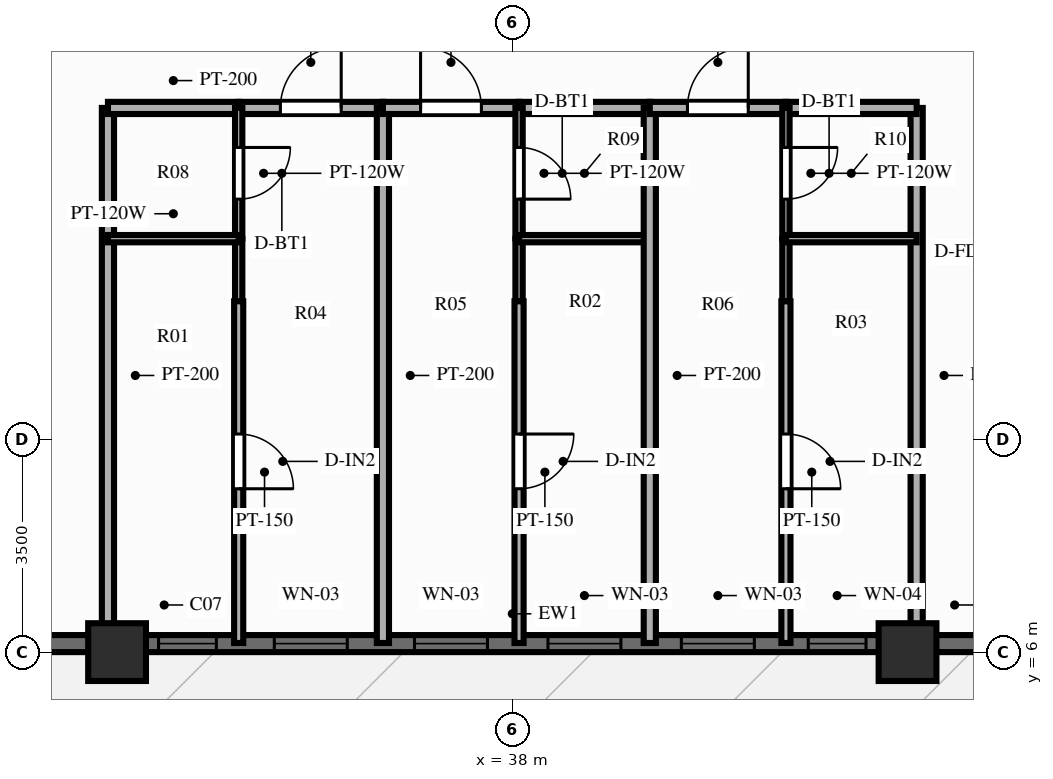
"""IFC4 building model, lengths in metres.
Left out: names, types, materials, properties, quantities, classifications, styles, units other than length and angle.
Written with IfcOpenShell. Run it as: python <this file> out.ifc"""

import sys

from ifc_helpers import new_model, si_unit, direction, frame, frame_2d, origin, origin_2d, place, context, subcontext, project, spatial, rectangle, extrude, source, transform, mapped, element, fill, save


model = new_model("IFC4")
c1 = context("Model", 3, precision=1e-05, world=origin(), true_north=direction((0.0, 1.0)))
c2 = subcontext(c1, "Body", "Model", "MODEL_VIEW")
j1 = project(units=[si_unit("LENGTHUNIT", "METRE"), si_unit("PLANEANGLEUNIT", "RADIAN")], contexts=[c1])
p1 = place(None, origin())
s1 = spatial("IfcSite", under=j1, at=p1, CompositionType="ELEMENT")
p2 = place(p1, origin())
s2 = spatial("IfcBuilding", under=s1, at=p2, CompositionType="ELEMENT")
p3 = place(p2, frame((0.0, 0.0, 163.0)))
s3 = spatial("IfcBuildingStorey", under=s2, at=p3, CompositionType="ELEMENT", Elevation=163.0)
m1 = source(origin(), c2, "Body", "SweptSolid", [
    extrude(rectangle(XDim=0.95, YDim=0.95, at=origin_2d()), origin(), (0.0, 0.0, 1.0), 3.0),
])
for number, where, z_axis, x_axis in (
    (1, (31.5, 6.0, 0.0), (0.0, 0.0, 1.0), (1.0, 0.0, 0.0)),
    (2, (44.5, 6.0, 0.0), (0.0, 0.0, 1.0), (1.0, 0.0, 0.0)),
):
    element("IfcColumn", number, at=place(p3, frame(where, z_axis=z_axis, x_axis=x_axis)), inside=s3, PredefinedType="COLUMN", context=c2, shape_type="MappedRepresentation", body=[
        mapped(m1, transform((0.0, 0.0, 0.0), scale=1.0)),
    ])
p4 = place(p3, frame((21.0, 6.14, 0.0), z_axis=(0.0, 0.0, 1.0), x_axis=(1.0, 0.0, 0.0)))
e3 = element("IfcWall", 3, at=p4, inside=s3, PredefinedType="SOLIDWALL", context=c2, shape_type="SweptSolid", body=[
    extrude(rectangle(XDim=34.0, YDim=0.28, at=frame_2d((17.0, 0.0))), origin(), (0.0, 0.0, 1.0), 2.28),
])
p5 = place(p4, frame((5.8, 0.0, 0.0), z_axis=(0.0, 0.0, 1.0), x_axis=(-1.0, 0.0, 0.0)))
e4 = element("IfcOpeningElement", 4, at=p5, cuts=e3, PredefinedType="OPENING", context=c2, shape_type="SweptSolid", body=[
    extrude(rectangle(XDim=1.1, YDim=2.15, at=frame_2d((0.55, 1.075))), frame((0.0, 0.152, 0.0), z_axis=(0.0, -1.0, 0.0), x_axis=(1.0, 0.0, 0.0)), (0.0, 0.0, 1.0), 0.304),
])
p6 = place(p4, frame((11.183, 0.0, 0.25)))
e5 = element("IfcOpeningElement", 5, at=p6, cuts=e3, PredefinedType="OPENING", context=c2, shape_type="SweptSolid", body=[
    extrude(rectangle(XDim=0.95, YDim=1.5, at=frame_2d((0.475, 0.75))), frame((0.0, 0.152, 0.0), z_axis=(0.0, -1.0, 0.0), x_axis=(1.0, 0.0, 0.0)), (0.0, 0.0, 1.0), 0.304),
])
p7 = place(p4, frame((13.086, 0.0, 0.25)))
e6 = element("IfcOpeningElement", 6, at=p7, cuts=e3, PredefinedType="OPENING", context=c2, shape_type="SweptSolid", body=[
    extrude(rectangle(XDim=1.2, YDim=1.5, at=frame_2d((0.6, 0.75))), frame((0.0, 0.152, 0.0), z_axis=(0.0, -1.0, 0.0), x_axis=(1.0, 0.0, 0.0)), (0.0, 0.0, 1.0), 0.304),
])
p8 = place(p4, frame((15.392, 0.0, 0.25)))
e7 = element("IfcOpeningElement", 7, at=p8, cuts=e3, PredefinedType="OPENING", context=c2, shape_type="SweptSolid", body=[
    extrude(rectangle(XDim=1.2, YDim=1.5, at=frame_2d((0.6, 0.75))), frame((0.0, 0.152, 0.0), z_axis=(0.0, -1.0, 0.0), x_axis=(1.0, 0.0, 0.0)), (0.0, 0.0, 1.0), 0.304),
])
p9 = place(p4, frame((17.586, 0.0, 0.25)))
e8 = element("IfcOpeningElement", 8, at=p9, cuts=e3, PredefinedType="OPENING", context=c2, shape_type="SweptSolid", body=[
    extrude(rectangle(XDim=1.2, YDim=1.5, at=frame_2d((0.6, 0.75))), frame((0.0, 0.152, 0.0), z_axis=(0.0, -1.0, 0.0), x_axis=(1.0, 0.0, 0.0)), (0.0, 0.0, 1.0), 0.304),
])
p10 = place(p4, frame((19.781, 0.0, 0.25)))
e9 = element("IfcOpeningElement", 9, at=p10, cuts=e3, PredefinedType="OPENING", context=c2, shape_type="SweptSolid", body=[
    extrude(rectangle(XDim=1.2, YDim=1.5, at=frame_2d((0.6, 0.75))), frame((0.0, 0.152, 0.0), z_axis=(0.0, -1.0, 0.0), x_axis=(1.0, 0.0, 0.0)), (0.0, 0.0, 1.0), 0.304),
])
p11 = place(p4, frame((21.867, 0.0, 0.25)))
e10 = element("IfcOpeningElement", 10, at=p11, cuts=e3, PredefinedType="OPENING", context=c2, shape_type="SweptSolid", body=[
    extrude(rectangle(XDim=0.95, YDim=1.5, at=frame_2d((0.475, 0.75))), frame((0.0, 0.152, 0.0), z_axis=(0.0, -1.0, 0.0), x_axis=(1.0, 0.0, 0.0)), (0.0, 0.0, 1.0), 0.304),
])
p12 = place(p4, frame((28.15, 0.0, 0.25)))
e11 = element("IfcOpeningElement", 11, at=p12, cuts=e3, PredefinedType="OPENING", context=c2, shape_type="SweptSolid", body=[
    extrude(rectangle(XDim=1.2, YDim=1.5, at=frame_2d((0.6, 0.75))), frame((0.0, 0.152, 0.0), z_axis=(0.0, -1.0, 0.0), x_axis=(1.0, 0.0, 0.0)), (0.0, 0.0, 1.0), 0.304),
])
for number, where, z_axis, x_axis in (
    (12, (31.35, 14.95, 0.0), (0.0, 0.0, 1.0), (0.0, -1.0, 0.0)),
    (13, (44.65, 14.95, 0.0), (0.0, 0.0, 1.0), (0.0, -1.0, 0.0)),
):
    element("IfcWall", number, at=place(p3, frame(where, z_axis=z_axis, x_axis=x_axis)), inside=s3, PredefinedType="PARTITIONING", context=c2, shape_type="SweptSolid", body=[
        extrude(rectangle(XDim=8.8, YDim=0.2, at=frame_2d((4.4, 0.0))), origin(), (0.0, 0.0, 1.0), 2.34),
    ])
p13 = place(p3, frame((31.35, 14.95, 0.0), z_axis=(0.0, 0.0, 1.0), x_axis=(1.0, 0.0, 0.0)))
e14 = element("IfcWall", 14, at=p13, inside=s3, PredefinedType="PARTITIONING", context=c2, shape_type="SweptSolid", body=[
    extrude(rectangle(XDim=2.15, YDim=0.2, at=frame_2d((1.075, 0.0))), origin(), (0.0, 0.0, 1.0), 2.79),
])
p14 = place(p3, frame((33.5, 14.95, 0.0), z_axis=(0.0, 0.0, 1.0), x_axis=(1.0, 0.0, 0.0)))
e15 = element("IfcWall", 15, at=p14, inside=s3, PredefinedType="PARTITIONING", context=c2, shape_type="SweptSolid", body=[
    extrude(rectangle(XDim=2.372, YDim=0.2, at=frame_2d((1.186, 0.0))), origin(), (0.0, 0.0, 1.0), 2.79),
])
p15 = place(p14, frame((0.686, 0.0, 0.0)))
e16 = element("IfcOpeningElement", 16, at=p15, cuts=e15, PredefinedType="OPENING", context=c2, shape_type="SweptSolid", body=[
    extrude(rectangle(XDim=1.0, YDim=2.15, at=frame_2d((0.5, 1.075))), frame((0.0, 0.112, 0.0), z_axis=(0.0, -1.0, 0.0), x_axis=(1.0, 0.0, 0.0)), (0.0, 0.0, 1.0), 0.224),
])
p16 = place(p3, frame((33.5, 14.95, 0.0), z_axis=(0.0, 0.0, 1.0), x_axis=(0.0, -1.0, 0.0)))
e17 = element("IfcWall", 17, at=p16, inside=s3, PredefinedType="PARTITIONING", context=c2, shape_type="SweptSolid", body=[
    extrude(rectangle(XDim=2.15, YDim=0.12, at=frame_2d((1.075, 0.0))), origin(), (0.0, 0.0, 1.0), 2.79),
])
p17 = place(p16, frame((0.65, 0.0, 0.0)))
e18 = element("IfcOpeningElement", 18, at=p17, cuts=e17, PredefinedType="OPENING", context=c2, shape_type="SweptSolid", body=[
    extrude(rectangle(XDim=0.85, YDim=2.05, at=frame_2d((0.425, 1.025))), frame((0.0, 0.072, 0.0), z_axis=(0.0, -1.0, 0.0), x_axis=(1.0, 0.0, 0.0)), (0.0, 0.0, 1.0), 0.144),
])
p18 = place(p3, frame((33.5, 12.8, 0.0), z_axis=(0.0, 0.0, 1.0), x_axis=(0.0, -1.0, 0.0)))
e19 = element("IfcWall", 19, at=p18, inside=s3, PredefinedType="PARTITIONING", context=c2, shape_type="SweptSolid", body=[
    extrude(rectangle(XDim=1.03, YDim=0.12, at=frame_2d((0.515, 0.0))), origin(), (0.0, 0.0, 1.0), 2.79),
])
p19 = place(p3, frame((31.35, 12.8, 0.0), z_axis=(0.0, 0.0, 1.0), x_axis=(1.0, 0.0, 0.0)))
e20 = element("IfcWall", 20, at=p19, inside=s3, PredefinedType="PARTITIONING", context=c2, shape_type="SweptSolid", body=[
    extrude(rectangle(XDim=2.15, YDim=0.12, at=frame_2d((1.075, 0.0))), origin(), (0.0, 0.0, 1.0), 2.79),
])
p20 = place(p3, frame((33.5, 11.77, 0.0), z_axis=(0.0, 0.0, 1.0), x_axis=(0.0, -1.0, 0.0)))
e21 = element("IfcWall", 21, at=p20, inside=s3, PredefinedType="PARTITIONING", context=c2, shape_type="SweptSolid", body=[
    extrude(rectangle(XDim=5.62, YDim=0.15, at=frame_2d((2.81, 0.0))), origin(), (0.0, 0.0, 1.0), 2.79),
])
p21 = place(p20, frame((2.183, 0.0, 0.0)))
e22 = element("IfcOpeningElement", 22, at=p21, cuts=e21, PredefinedType="OPENING", context=c2, shape_type="SweptSolid", body=[
    extrude(rectangle(XDim=0.9, YDim=2.1, at=frame_2d((0.45, 1.05))), frame((0.0, 0.087, 0.0), z_axis=(0.0, -1.0, 0.0), x_axis=(1.0, 0.0, 0.0)), (0.0, 0.0, 1.0), 0.174),
])
p22 = place(p3, frame((35.872, 14.95, 0.0), z_axis=(0.0, 0.0, 1.0), x_axis=(0.0, -1.0, 0.0)))
e23 = element("IfcWall", 23, at=p22, inside=s3, PredefinedType="PARTITIONING", context=c2, shape_type="SweptSolid", body=[
    extrude(rectangle(XDim=8.8, YDim=0.2, at=frame_2d((4.4, 0.0))), origin(), (0.0, 0.0, 1.0), 2.79),
])
p23 = place(p3, frame((35.872, 14.95, 0.0), z_axis=(0.0, 0.0, 1.0), x_axis=(1.0, 0.0, 0.0)))
e24 = element("IfcWall", 24, at=p23, inside=s3, PredefinedType="PARTITIONING", context=c2, shape_type="SweptSolid", body=[
    extrude(rectangle(XDim=2.239, YDim=0.2, at=frame_2d((1.12, 0.0))), origin(), (0.0, 0.0, 1.0), 2.79),
])
p24 = place(p23, frame((0.619, 0.0, 0.0)))
e25 = element("IfcOpeningElement", 25, at=p24, cuts=e24, PredefinedType="OPENING", context=c2, shape_type="SweptSolid", body=[
    extrude(rectangle(XDim=1.0, YDim=2.15, at=frame_2d((0.5, 1.075))), frame((0.0, 0.112, 0.0), z_axis=(0.0, -1.0, 0.0), x_axis=(1.0, 0.0, 0.0)), (0.0, 0.0, 1.0), 0.224),
])
p25 = place(p3, frame((38.111, 14.95, 0.0), z_axis=(0.0, 0.0, 1.0), x_axis=(1.0, 0.0, 0.0)))
e26 = element("IfcWall", 26, at=p25, inside=s3, PredefinedType="PARTITIONING", context=c2, shape_type="SweptSolid", body=[
    extrude(rectangle(XDim=2.15, YDim=0.2, at=frame_2d((1.075, 0.0))), origin(), (0.0, 0.0, 1.0), 2.79),
])
p26 = place(p3, frame((38.111, 14.95, 0.0), z_axis=(0.0, 0.0, 1.0), x_axis=(0.0, -1.0, 0.0)))
e27 = element("IfcWall", 27, at=p26, inside=s3, PredefinedType="PARTITIONING", context=c2, shape_type="SweptSolid", body=[
    extrude(rectangle(XDim=2.15, YDim=0.12, at=frame_2d((1.075, 0.0))), origin(), (0.0, 0.0, 1.0), 2.79),
])
p27 = place(p26, frame((0.65, 0.0, 0.0)))
e28 = element("IfcOpeningElement", 28, at=p27, cuts=e27, PredefinedType="OPENING", context=c2, shape_type="SweptSolid", body=[
    extrude(rectangle(XDim=0.85, YDim=2.05, at=frame_2d((0.425, 1.025))), frame((0.0, 0.072, 0.0), z_axis=(0.0, -1.0, 0.0), x_axis=(1.0, 0.0, 0.0)), (0.0, 0.0, 1.0), 0.144),
])
p28 = place(p3, frame((38.111, 12.8, 0.0), z_axis=(0.0, 0.0, 1.0), x_axis=(0.0, -1.0, 0.0)))
e29 = element("IfcWall", 29, at=p28, inside=s3, PredefinedType="PARTITIONING", context=c2, shape_type="SweptSolid", body=[
    extrude(rectangle(XDim=1.03, YDim=0.12, at=frame_2d((0.515, 0.0))), origin(), (0.0, 0.0, 1.0), 2.79),
])
p29 = place(p3, frame((38.111, 12.8, 0.0), z_axis=(0.0, 0.0, 1.0), x_axis=(1.0, 0.0, 0.0)))
e30 = element("IfcWall", 30, at=p29, inside=s3, PredefinedType="PARTITIONING", context=c2, shape_type="SweptSolid", body=[
    extrude(rectangle(XDim=2.15, YDim=0.12, at=frame_2d((1.075, 0.0))), origin(), (0.0, 0.0, 1.0), 2.79),
])
p30 = place(p3, frame((38.111, 11.77, 0.0), z_axis=(0.0, 0.0, 1.0), x_axis=(0.0, -1.0, 0.0)))
e31 = element("IfcWall", 31, at=p30, inside=s3, PredefinedType="PARTITIONING", context=c2, shape_type="SweptSolid", body=[
    extrude(rectangle(XDim=5.62, YDim=0.15, at=frame_2d((2.81, 0.0))), origin(), (0.0, 0.0, 1.0), 2.79),
])
p31 = place(p30, frame((2.183, 0.0, 0.0)))
e32 = element("IfcOpeningElement", 32, at=p31, cuts=e31, PredefinedType="OPENING", context=c2, shape_type="SweptSolid", body=[
    extrude(rectangle(XDim=0.9, YDim=2.1, at=frame_2d((0.45, 1.05))), frame((0.0, 0.087, 0.0), z_axis=(0.0, -1.0, 0.0), x_axis=(1.0, 0.0, 0.0)), (0.0, 0.0, 1.0), 0.174),
])
p32 = place(p3, frame((40.261, 14.95, 0.0), z_axis=(0.0, 0.0, 1.0), x_axis=(0.0, -1.0, 0.0)))
e33 = element("IfcWall", 33, at=p32, inside=s3, PredefinedType="PARTITIONING", context=c2, shape_type="SweptSolid", body=[
    extrude(rectangle(XDim=8.8, YDim=0.2, at=frame_2d((4.4, 0.0))), origin(), (0.0, 0.0, 1.0), 2.79),
])
p33 = place(p3, frame((40.261, 14.95, 0.0), z_axis=(0.0, 0.0, 1.0), x_axis=(1.0, 0.0, 0.0)))
e34 = element("IfcWall", 34, at=p33, inside=s3, PredefinedType="PARTITIONING", context=c2, shape_type="SweptSolid", body=[
    extrude(rectangle(XDim=2.239, YDim=0.2, at=frame_2d((1.12, 0.0))), origin(), (0.0, 0.0, 1.0), 2.79),
])
p34 = place(p33, frame((0.619, 0.0, 0.0)))
e35 = element("IfcOpeningElement", 35, at=p34, cuts=e34, PredefinedType="OPENING", context=c2, shape_type="SweptSolid", body=[
    extrude(rectangle(XDim=1.0, YDim=2.15, at=frame_2d((0.5, 1.075))), frame((0.0, 0.112, 0.0), z_axis=(0.0, -1.0, 0.0), x_axis=(1.0, 0.0, 0.0)), (0.0, 0.0, 1.0), 0.224),
])
p35 = place(p3, frame((42.5, 14.95, 0.0), z_axis=(0.0, 0.0, 1.0), x_axis=(1.0, 0.0, 0.0)))
e36 = element("IfcWall", 36, at=p35, inside=s3, PredefinedType="PARTITIONING", context=c2, shape_type="SweptSolid", body=[
    extrude(rectangle(XDim=2.15, YDim=0.2, at=frame_2d((1.075, 0.0))), origin(), (0.0, 0.0, 1.0), 2.79),
])
p36 = place(p3, frame((42.5, 14.95, 0.0), z_axis=(0.0, 0.0, 1.0), x_axis=(0.0, -1.0, 0.0)))
e37 = element("IfcWall", 37, at=p36, inside=s3, PredefinedType="PARTITIONING", context=c2, shape_type="SweptSolid", body=[
    extrude(rectangle(XDim=2.15, YDim=0.12, at=frame_2d((1.075, 0.0))), origin(), (0.0, 0.0, 1.0), 2.79),
])
p37 = place(p36, frame((0.65, 0.0, 0.0)))
e38 = element("IfcOpeningElement", 38, at=p37, cuts=e37, PredefinedType="OPENING", context=c2, shape_type="SweptSolid", body=[
    extrude(rectangle(XDim=0.85, YDim=2.05, at=frame_2d((0.425, 1.025))), frame((0.0, 0.072, 0.0), z_axis=(0.0, -1.0, 0.0), x_axis=(1.0, 0.0, 0.0)), (0.0, 0.0, 1.0), 0.144),
])
p38 = place(p3, frame((42.5, 12.8, 0.0), z_axis=(0.0, 0.0, 1.0), x_axis=(0.0, -1.0, 0.0)))
e39 = element("IfcWall", 39, at=p38, inside=s3, PredefinedType="PARTITIONING", context=c2, shape_type="SweptSolid", body=[
    extrude(rectangle(XDim=1.03, YDim=0.12, at=frame_2d((0.515, 0.0))), origin(), (0.0, 0.0, 1.0), 2.79),
])
p39 = place(p3, frame((42.5, 12.8, 0.0), z_axis=(0.0, 0.0, 1.0), x_axis=(1.0, 0.0, 0.0)))
e40 = element("IfcWall", 40, at=p39, inside=s3, PredefinedType="PARTITIONING", context=c2, shape_type="SweptSolid", body=[
    extrude(rectangle(XDim=2.15, YDim=0.12, at=frame_2d((1.075, 0.0))), origin(), (0.0, 0.0, 1.0), 2.79),
])
p40 = place(p3, frame((42.5, 11.77, 0.0), z_axis=(0.0, 0.0, 1.0), x_axis=(0.0, -1.0, 0.0)))
e41 = element("IfcWall", 41, at=p40, inside=s3, PredefinedType="PARTITIONING", context=c2, shape_type="SweptSolid", body=[
    extrude(rectangle(XDim=5.62, YDim=0.15, at=frame_2d((2.81, 0.0))), origin(), (0.0, 0.0, 1.0), 2.79),
])
p41 = place(p40, frame((2.183, 0.0, 0.0)))
e42 = element("IfcOpeningElement", 42, at=p41, cuts=e41, PredefinedType="OPENING", context=c2, shape_type="SweptSolid", body=[
    extrude(rectangle(XDim=0.9, YDim=2.1, at=frame_2d((0.45, 1.05))), frame((0.0, 0.087, 0.0), z_axis=(0.0, -1.0, 0.0), x_axis=(1.0, 0.0, 0.0)), (0.0, 0.0, 1.0), 0.174),
])
m2 = source(origin(), c2, "Body", "SweptSolid", [
    extrude(rectangle(XDim=0.95, YDim=1.5, at=frame_2d((0.475, 0.75))), frame((0.0, 0.03, 0.0), z_axis=(0.0, -1.0, 0.0), x_axis=(1.0, 0.0, 0.0)), (0.0, 0.0, 1.0), 0.06),
])
p42 = place(p6, origin())
e43 = element("IfcWindow", 43, at=p42, inside=s3, PartitioningType="SINGLE_PANEL", PredefinedType="WINDOW", context=c2, shape_type="MappedRepresentation", body=[
    mapped(m2, transform((0.0, 0.0, 0.0), scale=1.0)),
])
fill(e5, e43)
m3 = source(origin(), c2, "Body", "SweptSolid", [
    extrude(rectangle(XDim=1.2, YDim=1.5, at=frame_2d((0.6, 0.75))), frame((0.0, 0.03, 0.0), z_axis=(0.0, -1.0, 0.0), x_axis=(1.0, 0.0, 0.0)), (0.0, 0.0, 1.0), 0.06),
])
p43 = place(p7, origin())
e44 = element("IfcWindow", 44, at=p43, inside=s3, PartitioningType="SINGLE_PANEL", PredefinedType="WINDOW", context=c2, shape_type="MappedRepresentation", body=[
    mapped(m3, transform((0.0, 0.0, 0.0), scale=1.0)),
])
fill(e6, e44)
p44 = place(p8, origin())
e45 = element("IfcWindow", 45, at=p44, inside=s3, PartitioningType="SINGLE_PANEL", PredefinedType="WINDOW", context=c2, shape_type="MappedRepresentation", body=[
    mapped(m3, transform((0.0, 0.0, 0.0), scale=1.0)),
])
fill(e7, e45)
p45 = place(p9, origin())
e46 = element("IfcWindow", 46, at=p45, inside=s3, PartitioningType="SINGLE_PANEL", PredefinedType="WINDOW", context=c2, shape_type="MappedRepresentation", body=[
    mapped(m3, transform((0.0, 0.0, 0.0), scale=1.0)),
])
fill(e8, e46)
p46 = place(p10, origin())
e47 = element("IfcWindow", 47, at=p46, inside=s3, PartitioningType="SINGLE_PANEL", PredefinedType="WINDOW", context=c2, shape_type="MappedRepresentation", body=[
    mapped(m3, transform((0.0, 0.0, 0.0), scale=1.0)),
])
fill(e9, e47)
p47 = place(p11, origin())
e48 = element("IfcWindow", 48, at=p47, inside=s3, PartitioningType="SINGLE_PANEL", PredefinedType="WINDOW", context=c2, shape_type="MappedRepresentation", body=[
    mapped(m2, transform((0.0, 0.0, 0.0), scale=1.0)),
])
fill(e10, e48)
m4 = source(origin(), c2, "Body", "SweptSolid", [
    extrude(rectangle(XDim=1.0, YDim=2.15, at=frame_2d((0.5, 1.075))), frame((0.0, 0.025, 0.0), z_axis=(0.0, -1.0, 0.0), x_axis=(1.0, 0.0, 0.0)), (0.0, 0.0, 1.0), 0.05),
])
p48 = place(p15, origin())
e49 = element("IfcDoor", 49, at=p48, inside=s3, OperationType="SINGLE_SWING_RIGHT", PredefinedType="DOOR", context=c2, shape_type="MappedRepresentation", body=[
    mapped(m4, transform((0.0, 0.0, 0.0), scale=1.0)),
])
fill(e16, e49)
m5 = source(origin(), c2, "Body", "SweptSolid", [
    extrude(rectangle(XDim=0.85, YDim=2.05, at=frame_2d((0.425, 1.025))), frame((0.0, 0.025, 0.0), z_axis=(0.0, -1.0, 0.0), x_axis=(1.0, 0.0, 0.0)), (0.0, 0.0, 1.0), 0.05),
])
p49 = place(p17, origin())
e50 = element("IfcDoor", 50, at=p49, inside=s3, OperationType="SINGLE_SWING_LEFT", PredefinedType="DOOR", context=c2, shape_type="MappedRepresentation", body=[
    mapped(m5, transform((0.0, 0.0, 0.0), scale=1.0)),
])
fill(e18, e50)
m6 = source(origin(), c2, "Body", "SweptSolid", [
    extrude(rectangle(XDim=0.9, YDim=2.1, at=frame_2d((0.45, 1.05))), frame((0.0, 0.025, 0.0), z_axis=(0.0, -1.0, 0.0), x_axis=(1.0, 0.0, 0.0)), (0.0, 0.0, 1.0), 0.05),
])
p50 = place(p21, origin())
e51 = element("IfcDoor", 51, at=p50, inside=s3, OperationType="SINGLE_SWING_RIGHT", PredefinedType="DOOR", context=c2, shape_type="MappedRepresentation", body=[
    mapped(m6, transform((0.0, 0.0, 0.0), scale=1.0)),
])
fill(e22, e51)
p51 = place(p24, origin())
e52 = element("IfcDoor", 52, at=p51, inside=s3, OperationType="SINGLE_SWING_LEFT", PredefinedType="DOOR", context=c2, shape_type="MappedRepresentation", body=[
    mapped(m4, transform((0.0, 0.0, 0.0), scale=1.0)),
])
fill(e25, e52)
p52 = place(p27, origin())
e53 = element("IfcDoor", 53, at=p52, inside=s3, OperationType="SINGLE_SWING_RIGHT", PredefinedType="DOOR", context=c2, shape_type="MappedRepresentation", body=[
    mapped(m5, transform((0.0, 0.0, 0.0), scale=1.0)),
])
fill(e28, e53)
p53 = place(p31, origin())
e54 = element("IfcDoor", 54, at=p53, inside=s3, OperationType="SINGLE_SWING_LEFT", PredefinedType="DOOR", context=c2, shape_type="MappedRepresentation", body=[
    mapped(m6, transform((0.0, 0.0, 0.0), scale=1.0)),
])
fill(e32, e54)
p54 = place(p34, origin())
e55 = element("IfcDoor", 55, at=p54, inside=s3, OperationType="SINGLE_SWING_RIGHT", PredefinedType="DOOR", context=c2, shape_type="MappedRepresentation", body=[
    mapped(m4, transform((0.0, 0.0, 0.0), scale=1.0)),
])
fill(e35, e55)
p55 = place(p37, origin())
e56 = element("IfcDoor", 56, at=p55, inside=s3, OperationType="SINGLE_SWING_LEFT", PredefinedType="DOOR", context=c2, shape_type="MappedRepresentation", body=[
    mapped(m5, transform((0.0, 0.0, 0.0), scale=1.0)),
])
fill(e38, e56)
p56 = place(p41, origin())
e57 = element("IfcDoor", 57, at=p56, inside=s3, OperationType="SINGLE_SWING_RIGHT", PredefinedType="DOOR", context=c2, shape_type="MappedRepresentation", body=[
    mapped(m6, transform((0.0, 0.0, 0.0), scale=1.0)),
])
fill(e42, e57)
save(model, sys.argv[1])
